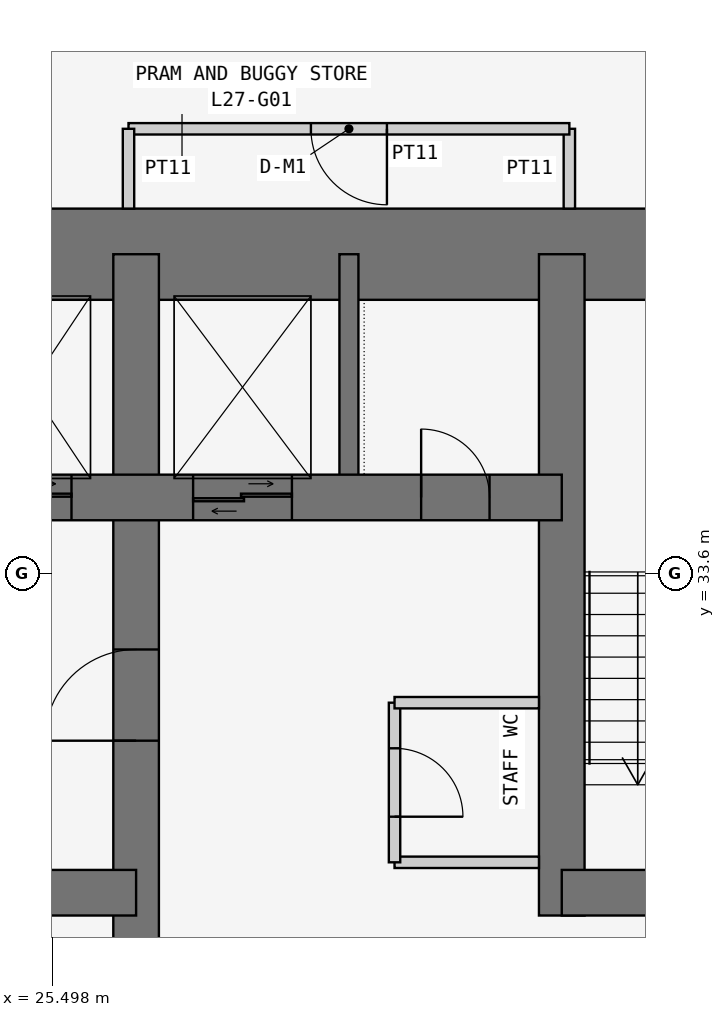
"""IFC4 building model, lengths in metres.
Left out: names, types, materials, properties, quantities, classifications, styles, units other than length and angle.
Written with IfcOpenShell. Run it as: python <this file> out.ifc"""

import sys

from ifc_helpers import new_model, si_unit, direction, frame, frame_2d, origin, place, context, subcontext, project, spatial, rectangle, extrude, element, fill, save


model = new_model("IFC4")
c1 = context("Model", 3, precision=1e-05, world=origin(), true_north=direction((0.0, 1.0)))
c2 = subcontext(c1, "Body", "Model", "MODEL_VIEW")
j1 = project(units=[si_unit("LENGTHUNIT", "METRE"), si_unit("PLANEANGLEUNIT", "RADIAN")], contexts=[c1])
p1 = place(None, origin())
s1 = spatial("IfcSite", under=j1, at=p1, CompositionType="ELEMENT")
p2 = place(p1, origin())
s2 = spatial("IfcBuilding", under=s1, at=p2, CompositionType="ELEMENT")
p3 = place(p2, frame((0.0, 0.0, 108.9)))
s3 = spatial("IfcBuildingStorey", under=s2, at=p3, CompositionType="ELEMENT", Elevation=108.9)
p4 = place(p3, frame((37.8, 37.8, 0.0), z_axis=(0.0, 0.0, 1.0), x_axis=(-1.0, 0.0, 0.0)))
e1 = element("IfcWall", 1, at=p4, inside=s3, PredefinedType="SHEAR", context=c2, shape_type="SweptSolid", body=[
    extrude(rectangle(XDim=17.4, YDim=1.2, at=frame_2d((8.7, 0.0))), origin(), (0.0, 0.0, 1.0), 3.6),
])
p5 = place(p3, frame((26.6, 21.0, 0.0), z_axis=(0.0, 0.0, 1.0), x_axis=(0.0, 1.0, 0.0)))
e2 = element("IfcWall", 2, at=p5, inside=s3, PredefinedType="SHEAR", context=c2, shape_type="SweptSolid", body=[
    extrude(rectangle(XDim=16.8, YDim=0.6, at=frame_2d((8.4, 0.0))), origin(), (0.0, 0.0, 1.0), 3.6),
])
p6 = place(p5, frame((10.4, 0.0, 0.0)))
e3 = element("IfcOpeningElement", 3, at=p6, cuts=e2, PredefinedType="OPENING", context=c2, shape_type="SweptSolid", body=[
    extrude(rectangle(XDim=1.2, YDim=2.1, at=frame_2d((0.6, 1.05))), frame((0.0, 0.31, 0.0), z_axis=(0.0, -1.0, 0.0), x_axis=(1.0, 0.0, 0.0)), (0.0, 0.0, 1.0), 0.62),
])
p7 = place(p3, frame((21.0, 29.4, 0.0), z_axis=(0.0, 0.0, 1.0), x_axis=(1.0, 0.0, 0.0)))
e4 = element("IfcWall", 4, at=p7, inside=s3, PredefinedType="SHEAR", context=c2, shape_type="SweptSolid", body=[
    extrude(rectangle(XDim=5.6, YDim=0.6, at=frame_2d((2.8, 0.0))), origin(), (0.0, 0.0, 1.0), 3.6),
])
p8 = place(p7, frame((2.3, 0.0, 0.0)))
e5 = element("IfcOpeningElement", 5, at=p8, cuts=e4, PredefinedType="OPENING", context=c2, shape_type="SweptSolid", body=[
    extrude(rectangle(XDim=1.2, YDim=2.1, at=frame_2d((0.6, 1.05))), frame((0.0, 0.31, 0.0), z_axis=(0.0, -1.0, 0.0), x_axis=(1.0, 0.0, 0.0)), (0.0, 0.0, 1.0), 0.62),
])
p9 = place(p3, frame((21.0, 34.6, 0.0), z_axis=(0.0, 0.0, 1.0), x_axis=(1.0, 0.0, 0.0)))
e6 = element("IfcWall", 6, at=p9, inside=s3, PredefinedType="SHEAR", context=c2, shape_type="SweptSolid", body=[
    extrude(rectangle(XDim=11.2, YDim=0.6, at=frame_2d((5.6, 0.0))), origin(), (0.0, 0.0, 1.0), 3.6),
])
p10 = place(p9, frame((9.35, 0.0, 0.0)))
e7 = element("IfcOpeningElement", 7, at=p10, cuts=e6, PredefinedType="OPENING", context=c2, shape_type="SweptSolid", body=[
    extrude(rectangle(XDim=0.9, YDim=2.1, at=frame_2d((0.45, 1.05))), frame((0.0, 0.31, 0.0), z_axis=(0.0, -1.0, 0.0), x_axis=(1.0, 0.0, 0.0)), (0.0, 0.0, 1.0), 0.62),
])
p11 = place(p9, frame((1.0, 0.0, 0.0)))
e8 = element("IfcOpeningElement", 8, at=p11, cuts=e6, PredefinedType="OPENING", context=c2, shape_type="SweptSolid", body=[
    extrude(rectangle(XDim=1.1, YDim=2.1, at=frame_2d((0.55, 1.05))), frame((0.0, 0.31, 0.0), z_axis=(0.0, -1.0, 0.0), x_axis=(1.0, 0.0, 0.0)), (0.0, 0.0, 1.0), 0.62),
])
p12 = place(p9, frame((3.65, 0.0, 0.0)))
e9 = element("IfcOpeningElement", 9, at=p12, cuts=e6, PredefinedType="OPENING", context=c2, shape_type="SweptSolid", body=[
    extrude(rectangle(XDim=1.1, YDim=2.1, at=frame_2d((0.55, 1.05))), frame((0.0, 0.31, 0.0), z_axis=(0.0, -1.0, 0.0), x_axis=(1.0, 0.0, 0.0)), (0.0, 0.0, 1.0), 0.62),
])
p13 = place(p9, frame((6.35, 0.0, 0.0)))
e10 = element("IfcOpeningElement", 10, at=p13, cuts=e6, PredefinedType="OPENING", context=c2, shape_type="SweptSolid", body=[
    extrude(rectangle(XDim=1.3, YDim=2.1, at=frame_2d((0.65, 1.05))), frame((0.0, 0.31, 0.0), z_axis=(0.0, -1.0, 0.0), x_axis=(1.0, 0.0, 0.0)), (0.0, 0.0, 1.0), 0.62),
])
p14 = place(p3, frame((32.2, 29.1, 0.0), z_axis=(0.0, 0.0, 1.0), x_axis=(0.0, 1.0, 0.0)))
e11 = element("IfcWall", 11, at=p14, inside=s3, PredefinedType="SHEAR", context=c2, shape_type="SweptSolid", body=[
    extrude(rectangle(XDim=8.7, YDim=0.6, at=frame_2d((4.35, 0.0))), origin(), (0.0, 0.0, 1.0), 3.6),
])
p15 = place(p3, frame((32.2, 29.4, 0.0), z_axis=(0.0, 0.0, 1.0), x_axis=(1.0, 0.0, 0.0)))
e12 = element("IfcWall", 12, at=p15, inside=s3, PredefinedType="SHEAR", context=c2, shape_type="SweptSolid", body=[
    extrude(rectangle(XDim=5.6, YDim=0.6, at=frame_2d((2.8, 0.0))), origin(), (0.0, 0.0, 1.0), 3.6),
])
p16 = place(p15, frame((2.0, 0.0, 0.0)))
e13 = element("IfcOpeningElement", 13, at=p16, cuts=e12, PredefinedType="OPENING", context=c2, shape_type="SweptSolid", body=[
    extrude(rectangle(XDim=1.2, YDim=2.1, at=frame_2d((0.6, 1.05))), frame((0.0, 0.31, 0.0), z_axis=(0.0, -1.0, 0.0), x_axis=(1.0, 0.0, 0.0)), (0.0, 0.0, 1.0), 0.62),
])
p17 = place(p3, frame((29.4, 34.6, 0.0), z_axis=(0.0, 0.0, 1.0), x_axis=(0.0, 1.0, 0.0)))
e14 = element("IfcWall", 14, at=p17, inside=s3, PredefinedType="SHEAR", context=c2, shape_type="SweptSolid", body=[
    extrude(rectangle(XDim=3.2, YDim=0.25, at=frame_2d((1.6, 0.0))), origin(), (0.0, 0.0, 1.0), 3.6),
])
p18 = place(p3, frame((32.3, 38.4, 0.0), z_axis=(0.0, 0.0, 1.0), x_axis=(0.0, 1.0, 0.0)))
e15 = element("IfcWall", 15, at=p18, inside=s3, PredefinedType="PARTITIONING", context=c2, shape_type="SweptSolid", body=[
    extrude(rectangle(XDim=1.05, YDim=0.15, at=frame_2d((0.525, 0.0))), origin(), (0.0, 0.0, 1.0), 3.45),
])
p19 = place(p3, frame((32.3, 39.45, 0.0), z_axis=(0.0, 0.0, 1.0), x_axis=(-1.0, 0.0, 0.0)))
e16 = element("IfcWall", 16, at=p19, inside=s3, PredefinedType="PARTITIONING", context=c2, shape_type="SweptSolid", body=[
    extrude(rectangle(XDim=5.8, YDim=0.15, at=frame_2d((2.9, 0.0))), origin(), (0.0, 0.0, 1.0), 3.45),
])
p20 = place(p19, frame((2.4, 0.0, 0.0)))
e17 = element("IfcOpeningElement", 17, at=p20, cuts=e16, PredefinedType="OPENING", context=c2, shape_type="SweptSolid", body=[
    extrude(rectangle(XDim=1.0, YDim=2.1, at=frame_2d((0.5, 1.05))), frame((0.0, 0.085, 0.0), z_axis=(0.0, -1.0, 0.0), x_axis=(1.0, 0.0, 0.0)), (0.0, 0.0, 1.0), 0.17),
])
p21 = place(p3, frame((26.5, 39.45, 0.0), z_axis=(0.0, 0.0, 1.0), x_axis=(0.0, -1.0, 0.0)))
e18 = element("IfcWall", 18, at=p21, inside=s3, PredefinedType="PARTITIONING", context=c2, shape_type="SweptSolid", body=[
    extrude(rectangle(XDim=1.05, YDim=0.15, at=frame_2d((0.525, 0.0))), origin(), (0.0, 0.0, 1.0), 3.45),
])
p22 = place(p3, frame((31.9, 29.8, 0.0), z_axis=(0.0, 0.0, 1.0), x_axis=(-1.0, 0.0, 0.0)))
e19 = element("IfcWall", 19, at=p22, inside=s3, PredefinedType="PARTITIONING", context=c2, shape_type="SweptSolid", body=[
    extrude(rectangle(XDim=1.9, YDim=0.15, at=frame_2d((0.95, 0.0))), origin(), (0.0, 0.0, 1.0), 3.45),
])
p23 = place(p3, frame((30.0, 29.8, 0.0), z_axis=(0.0, 0.0, 1.0), x_axis=(0.0, 1.0, 0.0)))
e20 = element("IfcWall", 20, at=p23, inside=s3, PredefinedType="PARTITIONING", context=c2, shape_type="SweptSolid", body=[
    extrude(rectangle(XDim=2.1, YDim=0.15, at=frame_2d((1.05, 0.0))), origin(), (0.0, 0.0, 1.0), 3.45),
])
p24 = place(p23, frame((0.6, 0.0, 0.0)))
e21 = element("IfcOpeningElement", 21, at=p24, cuts=e20, PredefinedType="OPENING", context=c2, shape_type="SweptSolid", body=[
    extrude(rectangle(XDim=0.9, YDim=2.1, at=frame_2d((0.45, 1.05))), frame((0.0, 0.085, 0.0), z_axis=(0.0, -1.0, 0.0), x_axis=(1.0, 0.0, 0.0)), (0.0, 0.0, 1.0), 0.17),
])
p25 = place(p3, frame((30.0, 31.9, 0.0), z_axis=(0.0, 0.0, 1.0), x_axis=(1.0, 0.0, 0.0)))
e22 = element("IfcWall", 22, at=p25, inside=s3, PredefinedType="PARTITIONING", context=c2, shape_type="SweptSolid", body=[
    extrude(rectangle(XDim=1.9, YDim=0.15, at=frame_2d((0.95, 0.0))), origin(), (0.0, 0.0, 1.0), 3.45),
])
p26 = place(p20, origin())
e23 = element("IfcDoor", 23, at=p26, inside=s3, OperationType="SINGLE_SWING_LEFT", PredefinedType="DOOR", context=c2, shape_type="SweptSolid", body=[
    extrude(rectangle(XDim=1.0, YDim=2.1, at=frame_2d((0.5, 1.05))), frame((0.0, 0.025, 0.0), z_axis=(0.0, -1.0, 0.0), x_axis=(1.0, 0.0, 0.0)), (0.0, 0.0, 1.0), 0.05),
])
fill(e17, e23)
p27 = place(p6, origin())
e24 = element("IfcDoor", 24, at=p27, inside=s3, OperationType="SINGLE_SWING_LEFT", PredefinedType="DOOR", context=c2, shape_type="SweptSolid", body=[
    extrude(rectangle(XDim=1.2, YDim=2.1, at=frame_2d((0.6, 1.05))), frame((0.0, 0.025, 0.0), z_axis=(0.0, -1.0, 0.0), x_axis=(1.0, 0.0, 0.0)), (0.0, 0.0, 1.0), 0.05),
])
fill(e3, e24)
p28 = place(p10, origin())
e25 = element("IfcDoor", 25, at=p28, inside=s3, OperationType="SINGLE_SWING_LEFT", PredefinedType="DOOR", context=c2, shape_type="SweptSolid", body=[
    extrude(rectangle(XDim=0.9, YDim=2.1, at=frame_2d((0.45, 1.05))), frame((0.0, 0.025, 0.0), z_axis=(0.0, -1.0, 0.0), x_axis=(1.0, 0.0, 0.0)), (0.0, 0.0, 1.0), 0.05),
])
fill(e7, e25)
p29 = place(p24, frame((0.9, 0.0, 0.0), z_axis=(0.0, 0.0, 1.0), x_axis=(-1.0, 0.0, 0.0)))
e26 = element("IfcDoor", 26, at=p29, inside=s3, OperationType="SINGLE_SWING_RIGHT", PredefinedType="DOOR", context=c2, shape_type="SweptSolid", body=[
    extrude(rectangle(XDim=0.9, YDim=2.1, at=frame_2d((0.45, 1.05))), frame((0.0, 0.025, 0.0), z_axis=(0.0, -1.0, 0.0), x_axis=(1.0, 0.0, 0.0)), (0.0, 0.0, 1.0), 0.05),
])
fill(e21, e26)
p30 = place(p12, origin())
e27 = element("IfcDoor", 27, at=p30, inside=s3, OperationType="DOUBLE_DOOR_SLIDING", PredefinedType="DOOR", context=c2, shape_type="SweptSolid", body=[
    extrude(rectangle(XDim=1.1, YDim=2.1, at=frame_2d((0.55, 1.05))), frame((0.0, 0.025, 0.0), z_axis=(0.0, -1.0, 0.0), x_axis=(1.0, 0.0, 0.0)), (0.0, 0.0, 1.0), 0.05),
])
fill(e9, e27)
p31 = place(p13, origin())
e28 = element("IfcDoor", 28, at=p31, inside=s3, OperationType="DOUBLE_DOOR_SLIDING", PredefinedType="DOOR", context=c2, shape_type="SweptSolid", body=[
    extrude(rectangle(XDim=1.3, YDim=2.1, at=frame_2d((0.65, 1.05))), frame((0.0, 0.025, 0.0), z_axis=(0.0, -1.0, 0.0), x_axis=(1.0, 0.0, 0.0)), (0.0, 0.0, 1.0), 0.05),
])
fill(e10, e28)
save(model, sys.argv[1])
